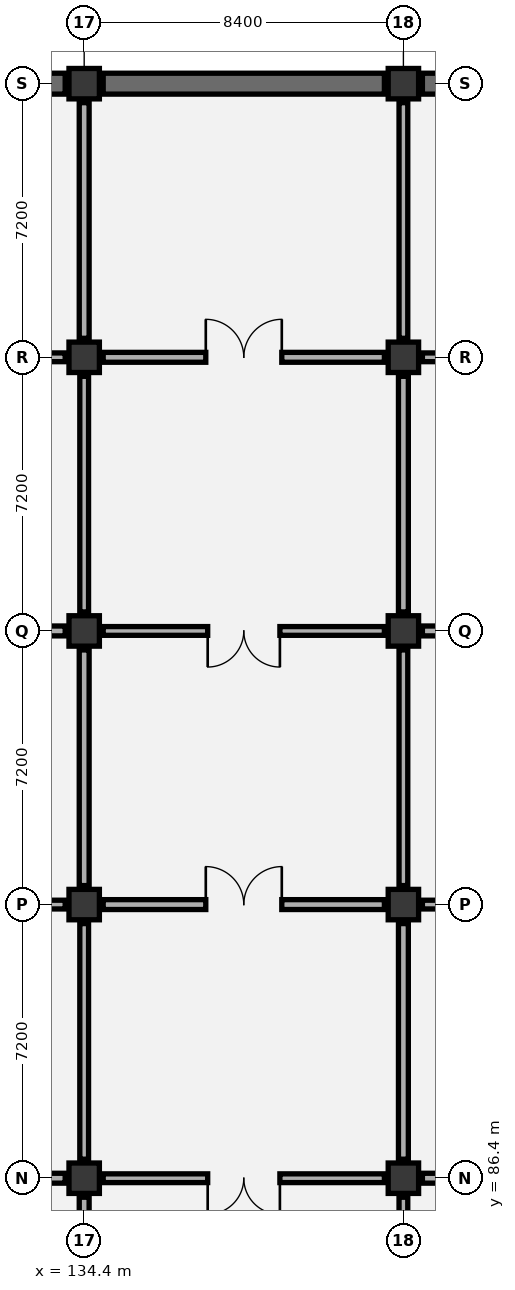
"""IFC4 building model, lengths in metres.
Left out: names, types, materials, properties, quantities, classifications, styles, units other than length and angle.
Written with IfcOpenShell. Run it as: python <this file> out.ifc"""

import sys

from ifc_helpers import new_model, si_unit, direction, frame, frame_2d, origin, origin_2d, place, context, subcontext, project, spatial, rectangle, extrude, element, fill, save


model = new_model("IFC4")
c1 = context("Model", 3, precision=1e-05, world=origin(), true_north=direction((0.0, 1.0)))
c2 = subcontext(c1, "Body", "Model", "MODEL_VIEW")
j1 = project(units=[si_unit("LENGTHUNIT", "METRE"), si_unit("PLANEANGLEUNIT", "RADIAN")], contexts=[c1])
p1 = place(None, origin())
s1 = spatial("IfcSite", under=j1, at=p1, CompositionType="ELEMENT")
p2 = place(p1, origin())
s2 = spatial("IfcBuilding", under=s1, at=p2, CompositionType="ELEMENT")
p3 = place(p2, frame((0.0, 0.0, -9.6)))
s3 = spatial("IfcBuildingStorey", under=s2, at=p3, CompositionType="ELEMENT", Elevation=-9.6)
for number, where, z_axis, x_axis in (
    (1, (134.4, 86.4, 0.0), (0.0, 0.0, 1.0), (1.0, 0.0, 0.0)),
    (2, (134.4, 93.6, 0.0), (0.0, 0.0, 1.0), (1.0, 0.0, 0.0)),
    (3, (134.4, 100.8, 0.0), (0.0, 0.0, 1.0), (1.0, 0.0, 0.0)),
    (4, (134.4, 108.0, 0.0), (0.0, 0.0, 1.0), (1.0, 0.0, 0.0)),
    (5, (134.4, 115.2, 0.0), (0.0, 0.0, 1.0), (1.0, 0.0, 0.0)),
    (6, (142.8, 86.4, 0.0), (0.0, 0.0, 1.0), (1.0, 0.0, 0.0)),
    (7, (142.8, 93.6, 0.0), (0.0, 0.0, 1.0), (1.0, 0.0, 0.0)),
    (8, (142.8, 100.8, 0.0), (0.0, 0.0, 1.0), (1.0, 0.0, 0.0)),
    (9, (142.8, 108.0, 0.0), (0.0, 0.0, 1.0), (1.0, 0.0, 0.0)),
    (10, (142.8, 115.2, 0.0), (0.0, 0.0, 1.0), (1.0, 0.0, 0.0)),
):
    element("IfcColumn", number, at=place(p3, frame(where, z_axis=z_axis, x_axis=x_axis)), inside=s3, PredefinedType="COLUMN", context=c2, shape_type="SweptSolid", body=[
        extrude(rectangle(XDim=0.8, YDim=0.8, at=origin_2d()), origin(), (0.0, 0.0, 1.0), 4.8),
    ])
p4 = place(p3, frame((126.5, 115.2, 0.0), z_axis=(0.0, 0.0, 1.0), x_axis=(1.0, 0.0, 0.0)))
e11 = element("IfcWall", 11, at=p4, inside=s3, PredefinedType="USERDEFINED", context=c2, shape_type="SweptSolid", body=[
    extrude(rectangle(XDim=7.4, YDim=0.55, at=frame_2d((3.7, 0.0))), origin(), (0.0, 0.0, 1.0), 4.4),
])
p5 = place(p3, frame((134.9, 115.2, 0.0), z_axis=(0.0, 0.0, 1.0), x_axis=(1.0, 0.0, 0.0)))
e12 = element("IfcWall", 12, at=p5, inside=s3, PredefinedType="USERDEFINED", context=c2, shape_type="SweptSolid", body=[
    extrude(rectangle(XDim=7.4, YDim=0.55, at=frame_2d((3.7, 0.0))), origin(), (0.0, 0.0, 1.0), 4.4),
])
p6 = place(p3, frame((143.3, 115.2, 0.0), z_axis=(0.0, 0.0, 1.0), x_axis=(1.0, 0.0, 0.0)))
e13 = element("IfcWall", 13, at=p6, inside=s3, PredefinedType="USERDEFINED", context=c2, shape_type="SweptSolid", body=[
    extrude(rectangle(XDim=7.4, YDim=0.55, at=frame_2d((3.7, 0.0))), origin(), (0.0, 0.0, 1.0), 4.4),
])
p7 = place(p3, frame((134.4, 79.7, 0.0), z_axis=(0.0, 0.0, 1.0), x_axis=(0.0, 1.0, 0.0)))
e14 = element("IfcWall", 14, at=p7, inside=s3, PredefinedType="PARTITIONING", context=c2, shape_type="SweptSolid", body=[
    extrude(rectangle(XDim=6.2, YDim=0.26, at=frame_2d((3.1, 0.0))), origin(), (0.0, 0.0, 1.0), 3.595),
])
p8 = place(p7, frame((2.1, 0.0, 0.0)))
e15 = element("IfcOpeningElement", 15, at=p8, cuts=e14, PredefinedType="OPENING", context=c2, shape_type="SweptSolid", body=[
    extrude(rectangle(XDim=2.0, YDim=2.35, at=frame_2d((1.0, 1.175))), frame((0.0, 0.14, 0.0), z_axis=(0.0, -1.0, 0.0), x_axis=(1.0, 0.0, 0.0)), (0.0, 0.0, 1.0), 0.28),
])
p9 = place(p3, frame((126.5, 86.4, 0.0), z_axis=(0.0, 0.0, 1.0), x_axis=(1.0, 0.0, 0.0)))
e16 = element("IfcWall", 16, at=p9, inside=s3, PredefinedType="PARTITIONING", context=c2, shape_type="SweptSolid", body=[
    extrude(rectangle(XDim=7.4, YDim=0.26, at=frame_2d((3.7, 0.0))), origin(), (0.0, 0.0, 1.0), 3.495),
])
p10 = place(p9, frame((2.75, 0.0, 0.0)))
e17 = element("IfcOpeningElement", 17, at=p10, cuts=e16, PredefinedType="OPENING", context=c2, shape_type="SweptSolid", body=[
    extrude(rectangle(XDim=1.9, YDim=2.3, at=frame_2d((0.95, 1.15))), frame((0.0, 0.14, 0.0), z_axis=(0.0, -1.0, 0.0), x_axis=(1.0, 0.0, 0.0)), (0.0, 0.0, 1.0), 0.28),
])
p11 = place(p3, frame((134.4, 86.9, 0.0), z_axis=(0.0, 0.0, 1.0), x_axis=(0.0, 1.0, 0.0)))
e18 = element("IfcWall", 18, at=p11, inside=s3, PredefinedType="PARTITIONING", context=c2, shape_type="SweptSolid", body=[
    extrude(rectangle(XDim=6.2, YDim=0.23, at=frame_2d((3.1, 0.0))), origin(), (0.0, 0.0, 1.0), 3.595),
])
p12 = place(p3, frame((126.5, 93.6, 0.0), z_axis=(0.0, 0.0, 1.0), x_axis=(1.0, 0.0, 0.0)))
e19 = element("IfcWall", 19, at=p12, inside=s3, PredefinedType="PARTITIONING", context=c2, shape_type="SweptSolid", body=[
    extrude(rectangle(XDim=7.4, YDim=0.23, at=frame_2d((3.7, 0.0))), origin(), (0.0, 0.0, 1.0), 3.495),
])
p13 = place(p12, frame((2.7, 0.0, 0.0)))
e20 = element("IfcOpeningElement", 20, at=p13, cuts=e19, PredefinedType="OPENING", context=c2, shape_type="SweptSolid", body=[
    extrude(rectangle(XDim=2.0, YDim=2.35, at=frame_2d((1.0, 1.175))), frame((0.0, 0.125, 0.0), z_axis=(0.0, -1.0, 0.0), x_axis=(1.0, 0.0, 0.0)), (0.0, 0.0, 1.0), 0.25),
])
p14 = place(p3, frame((134.4, 94.1, 0.0), z_axis=(0.0, 0.0, 1.0), x_axis=(0.0, 1.0, 0.0)))
e21 = element("IfcWall", 21, at=p14, inside=s3, PredefinedType="PARTITIONING", context=c2, shape_type="SweptSolid", body=[
    extrude(rectangle(XDim=6.2, YDim=0.26, at=frame_2d((3.1, 0.0))), origin(), (0.0, 0.0, 1.0), 3.595),
])
p15 = place(p3, frame((126.5, 100.8, 0.0), z_axis=(0.0, 0.0, 1.0), x_axis=(1.0, 0.0, 0.0)))
e22 = element("IfcWall", 22, at=p15, inside=s3, PredefinedType="PARTITIONING", context=c2, shape_type="SweptSolid", body=[
    extrude(rectangle(XDim=7.4, YDim=0.26, at=frame_2d((3.7, 0.0))), origin(), (0.0, 0.0, 1.0), 3.495),
])
p16 = place(p15, frame((2.75, 0.0, 0.0)))
e23 = element("IfcOpeningElement", 23, at=p16, cuts=e22, PredefinedType="OPENING", context=c2, shape_type="SweptSolid", body=[
    extrude(rectangle(XDim=1.9, YDim=2.3, at=frame_2d((0.95, 1.15))), frame((0.0, 0.14, 0.0), z_axis=(0.0, -1.0, 0.0), x_axis=(1.0, 0.0, 0.0)), (0.0, 0.0, 1.0), 0.28),
])
p17 = place(p3, frame((134.4, 101.3, 0.0), z_axis=(0.0, 0.0, 1.0), x_axis=(0.0, 1.0, 0.0)))
e24 = element("IfcWall", 24, at=p17, inside=s3, PredefinedType="PARTITIONING", context=c2, shape_type="SweptSolid", body=[
    extrude(rectangle(XDim=6.2, YDim=0.23, at=frame_2d((3.1, 0.0))), origin(), (0.0, 0.0, 1.0), 3.595),
])
p18 = place(p3, frame((126.5, 108.0, 0.0), z_axis=(0.0, 0.0, 1.0), x_axis=(1.0, 0.0, 0.0)))
e25 = element("IfcWall", 25, at=p18, inside=s3, PredefinedType="PARTITIONING", context=c2, shape_type="SweptSolid", body=[
    extrude(rectangle(XDim=7.4, YDim=0.23, at=frame_2d((3.7, 0.0))), origin(), (0.0, 0.0, 1.0), 3.495),
])
p19 = place(p18, frame((2.7, 0.0, 0.0)))
e26 = element("IfcOpeningElement", 26, at=p19, cuts=e25, PredefinedType="OPENING", context=c2, shape_type="SweptSolid", body=[
    extrude(rectangle(XDim=2.0, YDim=2.35, at=frame_2d((1.0, 1.175))), frame((0.0, 0.125, 0.0), z_axis=(0.0, -1.0, 0.0), x_axis=(1.0, 0.0, 0.0)), (0.0, 0.0, 1.0), 0.25),
])
p20 = place(p3, frame((134.4, 108.5, 0.0), z_axis=(0.0, 0.0, 1.0), x_axis=(0.0, 1.0, 0.0)))
e27 = element("IfcWall", 27, at=p20, inside=s3, PredefinedType="PARTITIONING", context=c2, shape_type="SweptSolid", body=[
    extrude(rectangle(XDim=6.2, YDim=0.26, at=frame_2d((3.1, 0.0))), origin(), (0.0, 0.0, 1.0), 3.595),
])
p21 = place(p3, frame((142.8, 79.7, 0.0), z_axis=(0.0, 0.0, 1.0), x_axis=(0.0, 1.0, 0.0)))
e28 = element("IfcWall", 28, at=p21, inside=s3, PredefinedType="PARTITIONING", context=c2, shape_type="SweptSolid", body=[
    extrude(rectangle(XDim=6.2, YDim=0.23, at=frame_2d((3.1, 0.0))), origin(), (0.0, 0.0, 1.0), 3.595),
])
p22 = place(p21, frame((2.1, 0.0, 0.0)))
e29 = element("IfcOpeningElement", 29, at=p22, cuts=e28, PredefinedType="OPENING", context=c2, shape_type="SweptSolid", body=[
    extrude(rectangle(XDim=2.0, YDim=2.35, at=frame_2d((1.0, 1.175))), frame((0.0, 0.125, 0.0), z_axis=(0.0, -1.0, 0.0), x_axis=(1.0, 0.0, 0.0)), (0.0, 0.0, 1.0), 0.25),
])
p23 = place(p3, frame((134.9, 86.4, 0.0), z_axis=(0.0, 0.0, 1.0), x_axis=(1.0, 0.0, 0.0)))
e30 = element("IfcWall", 30, at=p23, inside=s3, PredefinedType="PARTITIONING", context=c2, shape_type="SweptSolid", body=[
    extrude(rectangle(XDim=7.4, YDim=0.23, at=frame_2d((3.7, 0.0))), origin(), (0.0, 0.0, 1.0), 3.495),
])
p24 = place(p23, frame((2.75, 0.0, 0.0)))
e31 = element("IfcOpeningElement", 31, at=p24, cuts=e30, PredefinedType="OPENING", context=c2, shape_type="SweptSolid", body=[
    extrude(rectangle(XDim=1.9, YDim=2.3, at=frame_2d((0.95, 1.15))), frame((0.0, 0.125, 0.0), z_axis=(0.0, -1.0, 0.0), x_axis=(1.0, 0.0, 0.0)), (0.0, 0.0, 1.0), 0.25),
])
p25 = place(p3, frame((142.8, 86.9, 0.0), z_axis=(0.0, 0.0, 1.0), x_axis=(0.0, 1.0, 0.0)))
e32 = element("IfcWall", 32, at=p25, inside=s3, PredefinedType="PARTITIONING", context=c2, shape_type="SweptSolid", body=[
    extrude(rectangle(XDim=6.2, YDim=0.26, at=frame_2d((3.1, 0.0))), origin(), (0.0, 0.0, 1.0), 3.595),
])
p26 = place(p3, frame((134.9, 93.6, 0.0), z_axis=(0.0, 0.0, 1.0), x_axis=(1.0, 0.0, 0.0)))
e33 = element("IfcWall", 33, at=p26, inside=s3, PredefinedType="PARTITIONING", context=c2, shape_type="SweptSolid", body=[
    extrude(rectangle(XDim=7.4, YDim=0.26, at=frame_2d((3.7, 0.0))), origin(), (0.0, 0.0, 1.0), 3.495),
])
p27 = place(p26, frame((2.7, 0.0, 0.0)))
e34 = element("IfcOpeningElement", 34, at=p27, cuts=e33, PredefinedType="OPENING", context=c2, shape_type="SweptSolid", body=[
    extrude(rectangle(XDim=2.0, YDim=2.35, at=frame_2d((1.0, 1.175))), frame((0.0, 0.14, 0.0), z_axis=(0.0, -1.0, 0.0), x_axis=(1.0, 0.0, 0.0)), (0.0, 0.0, 1.0), 0.28),
])
p28 = place(p3, frame((142.8, 94.1, 0.0), z_axis=(0.0, 0.0, 1.0), x_axis=(0.0, 1.0, 0.0)))
e35 = element("IfcWall", 35, at=p28, inside=s3, PredefinedType="PARTITIONING", context=c2, shape_type="SweptSolid", body=[
    extrude(rectangle(XDim=6.2, YDim=0.23, at=frame_2d((3.1, 0.0))), origin(), (0.0, 0.0, 1.0), 3.595),
])
p29 = place(p3, frame((134.9, 100.8, 0.0), z_axis=(0.0, 0.0, 1.0), x_axis=(1.0, 0.0, 0.0)))
e36 = element("IfcWall", 36, at=p29, inside=s3, PredefinedType="PARTITIONING", context=c2, shape_type="SweptSolid", body=[
    extrude(rectangle(XDim=7.4, YDim=0.23, at=frame_2d((3.7, 0.0))), origin(), (0.0, 0.0, 1.0), 3.495),
])
p30 = place(p29, frame((2.75, 0.0, 0.0)))
e37 = element("IfcOpeningElement", 37, at=p30, cuts=e36, PredefinedType="OPENING", context=c2, shape_type="SweptSolid", body=[
    extrude(rectangle(XDim=1.9, YDim=2.3, at=frame_2d((0.95, 1.15))), frame((0.0, 0.125, 0.0), z_axis=(0.0, -1.0, 0.0), x_axis=(1.0, 0.0, 0.0)), (0.0, 0.0, 1.0), 0.25),
])
p31 = place(p3, frame((142.8, 101.3, 0.0), z_axis=(0.0, 0.0, 1.0), x_axis=(0.0, 1.0, 0.0)))
e38 = element("IfcWall", 38, at=p31, inside=s3, PredefinedType="PARTITIONING", context=c2, shape_type="SweptSolid", body=[
    extrude(rectangle(XDim=6.2, YDim=0.26, at=frame_2d((3.1, 0.0))), origin(), (0.0, 0.0, 1.0), 3.595),
])
p32 = place(p3, frame((134.9, 108.0, 0.0), z_axis=(0.0, 0.0, 1.0), x_axis=(1.0, 0.0, 0.0)))
e39 = element("IfcWall", 39, at=p32, inside=s3, PredefinedType="PARTITIONING", context=c2, shape_type="SweptSolid", body=[
    extrude(rectangle(XDim=7.4, YDim=0.26, at=frame_2d((3.7, 0.0))), origin(), (0.0, 0.0, 1.0), 3.495),
])
p33 = place(p32, frame((2.7, 0.0, 0.0)))
e40 = element("IfcOpeningElement", 40, at=p33, cuts=e39, PredefinedType="OPENING", context=c2, shape_type="SweptSolid", body=[
    extrude(rectangle(XDim=2.0, YDim=2.35, at=frame_2d((1.0, 1.175))), frame((0.0, 0.14, 0.0), z_axis=(0.0, -1.0, 0.0), x_axis=(1.0, 0.0, 0.0)), (0.0, 0.0, 1.0), 0.28),
])
p34 = place(p3, frame((142.8, 108.5, 0.0), z_axis=(0.0, 0.0, 1.0), x_axis=(0.0, 1.0, 0.0)))
e41 = element("IfcWall", 41, at=p34, inside=s3, PredefinedType="PARTITIONING", context=c2, shape_type="SweptSolid", body=[
    extrude(rectangle(XDim=6.2, YDim=0.23, at=frame_2d((3.1, 0.0))), origin(), (0.0, 0.0, 1.0), 3.595),
])
p35 = place(p3, frame((143.3, 86.4, 0.0), z_axis=(0.0, 0.0, 1.0), x_axis=(1.0, 0.0, 0.0)))
e42 = element("IfcWall", 42, at=p35, inside=s3, PredefinedType="PARTITIONING", context=c2, shape_type="SweptSolid", body=[
    extrude(rectangle(XDim=7.4, YDim=0.26, at=frame_2d((3.7, 0.0))), origin(), (0.0, 0.0, 1.0), 3.495),
])
p36 = place(p35, frame((2.75, 0.0, 0.0)))
e43 = element("IfcOpeningElement", 43, at=p36, cuts=e42, PredefinedType="OPENING", context=c2, shape_type="SweptSolid", body=[
    extrude(rectangle(XDim=1.9, YDim=2.3, at=frame_2d((0.95, 1.15))), frame((0.0, 0.14, 0.0), z_axis=(0.0, -1.0, 0.0), x_axis=(1.0, 0.0, 0.0)), (0.0, 0.0, 1.0), 0.28),
])
p37 = place(p3, frame((143.3, 93.6, 0.0), z_axis=(0.0, 0.0, 1.0), x_axis=(1.0, 0.0, 0.0)))
e44 = element("IfcWall", 44, at=p37, inside=s3, PredefinedType="PARTITIONING", context=c2, shape_type="SweptSolid", body=[
    extrude(rectangle(XDim=7.4, YDim=0.23, at=frame_2d((3.7, 0.0))), origin(), (0.0, 0.0, 1.0), 3.495),
])
p38 = place(p37, frame((2.7, 0.0, 0.0)))
e45 = element("IfcOpeningElement", 45, at=p38, cuts=e44, PredefinedType="OPENING", context=c2, shape_type="SweptSolid", body=[
    extrude(rectangle(XDim=2.0, YDim=2.35, at=frame_2d((1.0, 1.175))), frame((0.0, 0.125, 0.0), z_axis=(0.0, -1.0, 0.0), x_axis=(1.0, 0.0, 0.0)), (0.0, 0.0, 1.0), 0.25),
])
p39 = place(p3, frame((143.3, 100.8, 0.0), z_axis=(0.0, 0.0, 1.0), x_axis=(1.0, 0.0, 0.0)))
e46 = element("IfcWall", 46, at=p39, inside=s3, PredefinedType="PARTITIONING", context=c2, shape_type="SweptSolid", body=[
    extrude(rectangle(XDim=7.4, YDim=0.26, at=frame_2d((3.7, 0.0))), origin(), (0.0, 0.0, 1.0), 3.495),
])
p40 = place(p39, frame((2.75, 0.0, 0.0)))
e47 = element("IfcOpeningElement", 47, at=p40, cuts=e46, PredefinedType="OPENING", context=c2, shape_type="SweptSolid", body=[
    extrude(rectangle(XDim=1.9, YDim=2.3, at=frame_2d((0.95, 1.15))), frame((0.0, 0.14, 0.0), z_axis=(0.0, -1.0, 0.0), x_axis=(1.0, 0.0, 0.0)), (0.0, 0.0, 1.0), 0.28),
])
p41 = place(p3, frame((143.3, 108.0, 0.0), z_axis=(0.0, 0.0, 1.0), x_axis=(1.0, 0.0, 0.0)))
e48 = element("IfcWall", 48, at=p41, inside=s3, PredefinedType="PARTITIONING", context=c2, shape_type="SweptSolid", body=[
    extrude(rectangle(XDim=7.4, YDim=0.23, at=frame_2d((3.7, 0.0))), origin(), (0.0, 0.0, 1.0), 3.495),
])
p42 = place(p41, frame((2.7, 0.0, 0.0)))
e49 = element("IfcOpeningElement", 49, at=p42, cuts=e48, PredefinedType="OPENING", context=c2, shape_type="SweptSolid", body=[
    extrude(rectangle(XDim=2.0, YDim=2.35, at=frame_2d((1.0, 1.175))), frame((0.0, 0.125, 0.0), z_axis=(0.0, -1.0, 0.0), x_axis=(1.0, 0.0, 0.0)), (0.0, 0.0, 1.0), 0.25),
])
p43 = place(p24, frame((1.9, 0.0, 0.0), z_axis=(0.0, 0.0, 1.0), x_axis=(-1.0, 0.0, 0.0)))
e50 = element("IfcDoor", 50, at=p43, inside=s3, OperationType="DOUBLE_DOOR_SINGLE_SWING", PredefinedType="DOOR", context=c2, shape_type="SweptSolid", body=[
    extrude(rectangle(XDim=1.9, YDim=2.3, at=frame_2d((0.95, 1.15))), frame((0.0, 0.025, 0.0), z_axis=(0.0, -1.0, 0.0), x_axis=(1.0, 0.0, 0.0)), (0.0, 0.0, 1.0), 0.05),
])
fill(e31, e50)
p44 = place(p27, origin())
e51 = element("IfcDoor", 51, at=p44, inside=s3, OperationType="DOUBLE_DOOR_SINGLE_SWING", PredefinedType="DOOR", context=c2, shape_type="SweptSolid", body=[
    extrude(rectangle(XDim=2.0, YDim=2.35, at=frame_2d((1.0, 1.175))), frame((0.0, 0.025, 0.0), z_axis=(0.0, -1.0, 0.0), x_axis=(1.0, 0.0, 0.0)), (0.0, 0.0, 1.0), 0.05),
])
fill(e34, e51)
p45 = place(p30, frame((1.9, 0.0, 0.0), z_axis=(0.0, 0.0, 1.0), x_axis=(-1.0, 0.0, 0.0)))
e52 = element("IfcDoor", 52, at=p45, inside=s3, OperationType="DOUBLE_DOOR_SINGLE_SWING", PredefinedType="DOOR", context=c2, shape_type="SweptSolid", body=[
    extrude(rectangle(XDim=1.9, YDim=2.3, at=frame_2d((0.95, 1.15))), frame((0.0, 0.025, 0.0), z_axis=(0.0, -1.0, 0.0), x_axis=(1.0, 0.0, 0.0)), (0.0, 0.0, 1.0), 0.05),
])
fill(e37, e52)
p46 = place(p33, origin())
e53 = element("IfcDoor", 53, at=p46, inside=s3, OperationType="DOUBLE_DOOR_SINGLE_SWING", PredefinedType="DOOR", context=c2, shape_type="SweptSolid", body=[
    extrude(rectangle(XDim=2.0, YDim=2.35, at=frame_2d((1.0, 1.175))), frame((0.0, 0.025, 0.0), z_axis=(0.0, -1.0, 0.0), x_axis=(1.0, 0.0, 0.0)), (0.0, 0.0, 1.0), 0.05),
])
fill(e40, e53)
save(model, sys.argv[1])
